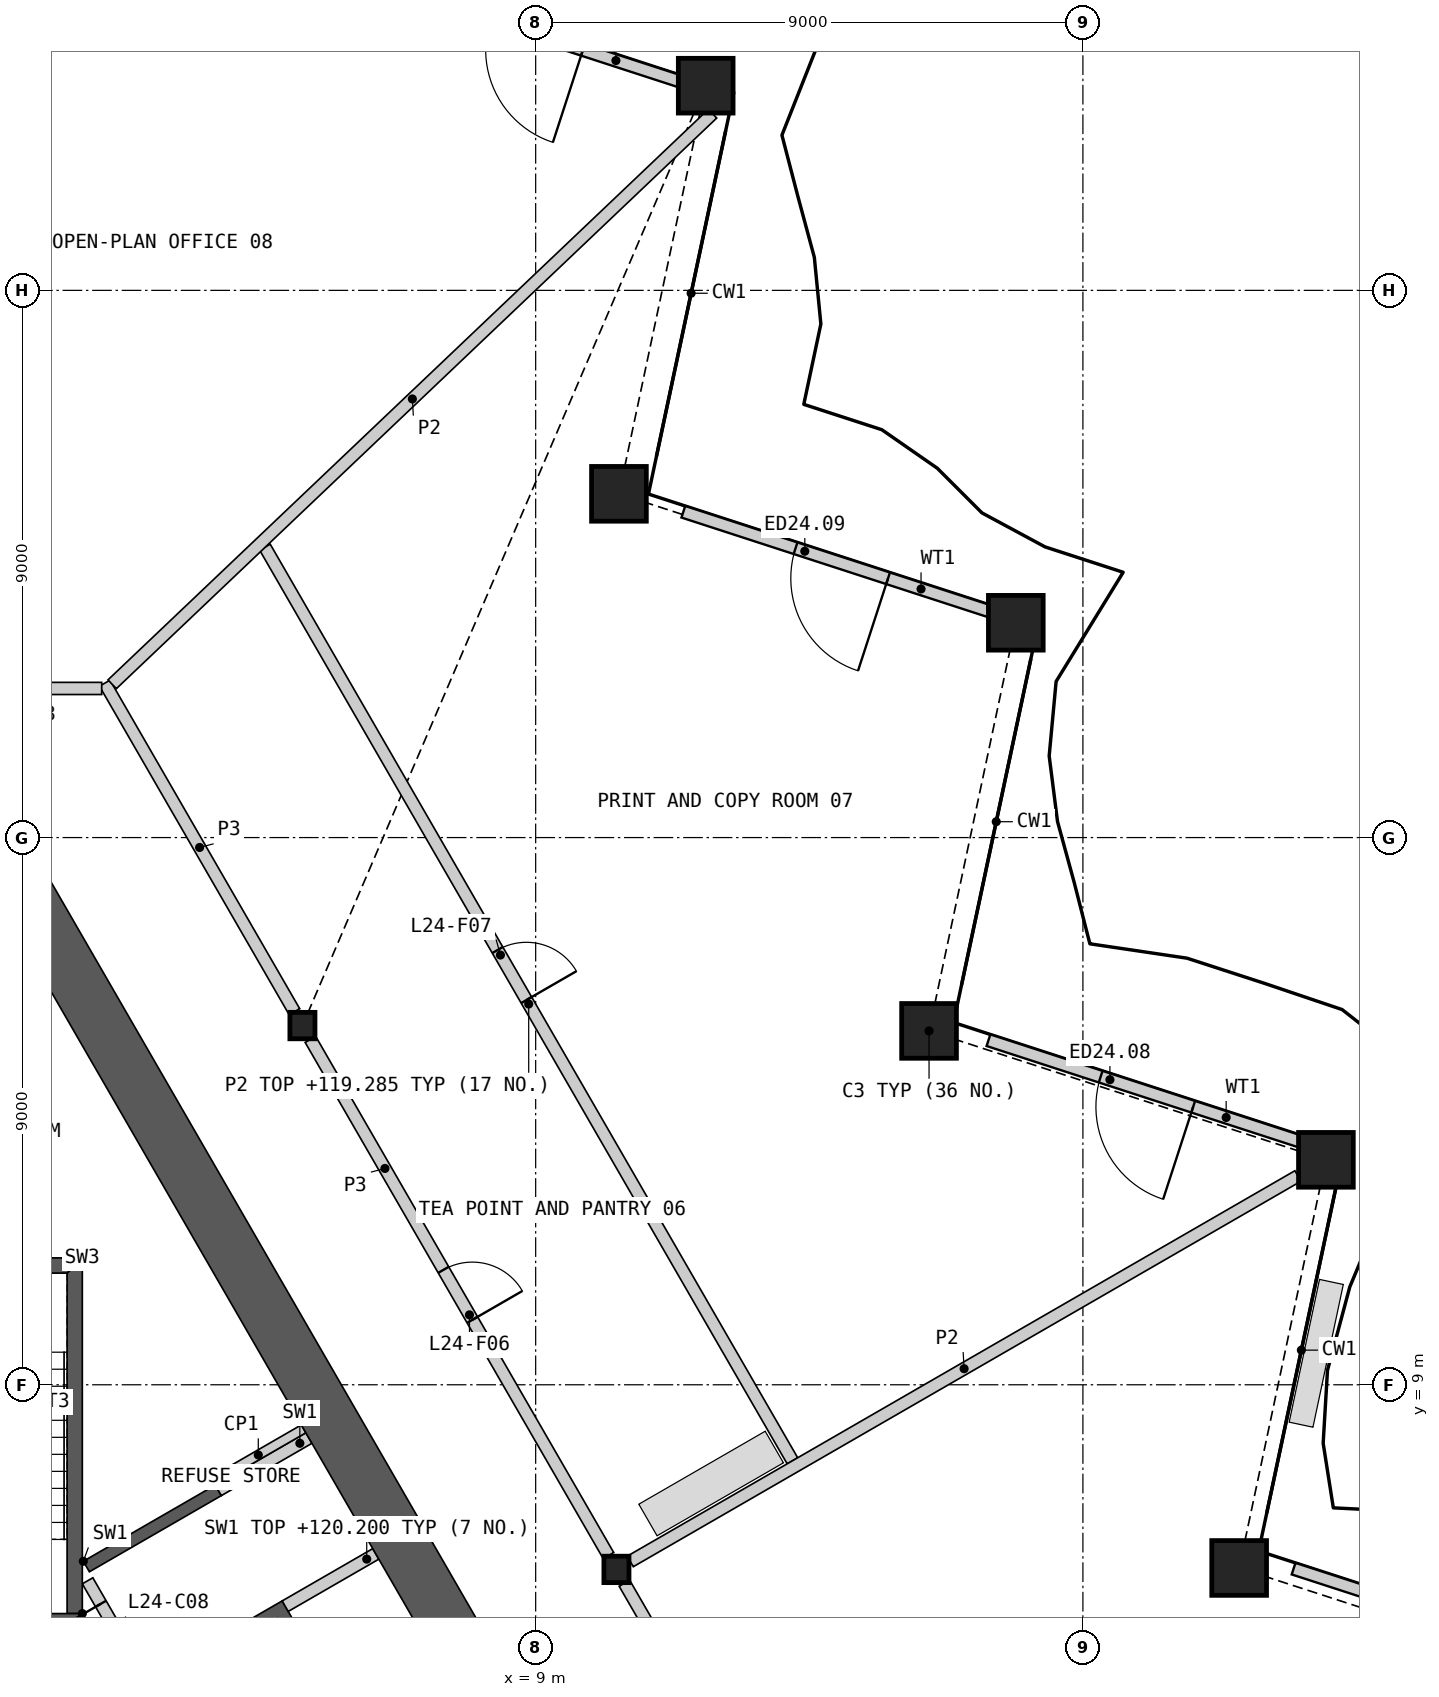
"""IFC4 building model, lengths in metres.
Left out: names, types, materials, properties, quantities, classifications, styles, units other than length and angle.
Written with IfcOpenShell. Run it as: python <this file> out.ifc"""

import sys

from ifc_helpers import new_model, si_unit, direction, frame, frame_2d, origin, origin_2d, place, context, subcontext, project, spatial, polyline, rectangle, hollow_rectangle, i_section, outline, extrude, element, fill, save


model = new_model("IFC4")
c1 = context("Model", 3, precision=1e-05, world=origin(), true_north=direction((0.0, 1.0)))
c2 = subcontext(c1, "Body", "Model", "MODEL_VIEW")
j1 = project(units=[si_unit("LENGTHUNIT", "METRE"), si_unit("PLANEANGLEUNIT", "RADIAN")], contexts=[c1])
p1 = place(None, origin())
s1 = spatial("IfcSite", under=j1, at=p1, CompositionType="ELEMENT")
p2 = place(p1, origin())
s2 = spatial("IfcBuilding", under=s1, at=p2, CompositionType="ELEMENT")
p3 = place(p2, frame((0.0, 0.0, 116.4)))
s3 = spatial("IfcBuildingStorey", under=s2, at=p3, CompositionType="ELEMENT", Elevation=116.4)
for number, where, z_axis, x_axis in (
    (1, (20.57, 5.987, 0.0), (0.0, 0.0, 1.0), (1.0, 0.0, 0.0)),
    (2, (21.996, 12.699, 0.0), (0.0, 0.0, 1.0), (1.0, 0.0, 0.0)),
    (3, (15.469, 14.82, 0.0), (0.0, 0.0, 1.0), (1.0, 0.0, 0.0)),
    (4, (16.896, 21.533, 0.0), (0.0, 0.0, 1.0), (1.0, 0.0, 0.0)),
    (5, (10.37, 23.654, 0.0), (0.0, 0.0, 1.0), (1.0, 0.0, 0.0)),
    (6, (11.796, 30.366, 0.0), (0.0, 0.0, 1.0), (1.0, 0.0, 0.0)),
):
    element("IfcColumn", number, at=place(p3, frame(where, z_axis=z_axis, x_axis=x_axis)), inside=s3, PredefinedType="COLUMN", context=c2, shape_type="SweptSolid", body=[
        extrude(hollow_rectangle(XDim=0.9, YDim=0.9, WallThickness=0.06, at=origin_2d()), origin(), (0.0, 0.0, 1.0), 4.2),
    ])
for number, where, z_axis, x_axis in (
    (7, (10.328, 5.963, 0.0), (0.0, 0.0, 1.0), (1.0, 0.0, 0.0)),
    (8, (5.164, 14.908, 0.0), (0.0, 0.0, 1.0), (1.0, 0.0, 0.0)),
):
    element("IfcColumn", number, at=place(p3, frame(where, z_axis=z_axis, x_axis=x_axis)), inside=s3, PredefinedType="COLUMN", context=c2, shape_type="SweptSolid", body=[
        extrude(i_section(OverallWidth=0.412, OverallDepth=0.435, WebThickness=0.036, FlangeThickness=0.057, at=origin_2d()), origin(), (0.0, 0.0, 1.0), 4.2),
    ])
p4 = place(p3, frame((26.677, 4.282, 0.0), z_axis=(0.0, 0.0, 1.0), x_axis=(-0.951052727247, 0.309028655624, 0.0)))
e9 = element("IfcWall", 9, at=p4, inside=s3, PredefinedType="SOLIDWALL", context=c2, shape_type="SweptSolid", body=[
    extrude(rectangle(XDim=5.48, YDim=0.2, at=frame_2d((2.74, 0.0))), origin(), (0.0, 0.0, 1.0), 3.189),
])
p5 = place(p4, frame((1.94, 0.0, 0.0)))
e10 = element("IfcOpeningElement", 10, at=p5, cuts=e9, PredefinedType="OPENING", context=c2, shape_type="SweptSolid", body=[
    extrude(rectangle(XDim=1.6, YDim=2.4, at=frame_2d((0.8, 1.2))), frame((0.0, 0.11, 0.0), z_axis=(0.0, -1.0, 0.0), x_axis=(1.0, 0.0, 0.0)), (0.0, 0.0, 1.0), 0.22),
])
p6 = place(p3, frame((21.659, 12.973, 0.0), z_axis=(0.0, 0.0, 1.0), x_axis=(-0.951065819309, 0.308988361175, 0.0)))
e11 = element("IfcWall", 11, at=p6, inside=s3, PredefinedType="SOLIDWALL", context=c2, shape_type="SweptSolid", body=[
    extrude(rectangle(XDim=5.48, YDim=0.2, at=frame_2d((2.74, 0.0))), origin(), (0.0, 0.0, 1.0), 3.189),
])
p7 = place(p6, frame((1.94, 0.0, 0.0)))
e12 = element("IfcOpeningElement", 12, at=p7, cuts=e11, PredefinedType="OPENING", context=c2, shape_type="SweptSolid", body=[
    extrude(rectangle(XDim=1.6, YDim=2.4, at=frame_2d((0.8, 1.2))), frame((0.0, 0.11, 0.0), z_axis=(0.0, -1.0, 0.0), x_axis=(1.0, 0.0, 0.0)), (0.0, 0.0, 1.0), 0.22),
])
p8 = place(p3, frame((16.641, 21.665, 0.0), z_axis=(0.0, 0.0, 1.0), x_axis=(-0.951052727247, 0.309028655624, 0.0)))
e13 = element("IfcWall", 13, at=p8, inside=s3, PredefinedType="SOLIDWALL", context=c2, shape_type="SweptSolid", body=[
    extrude(rectangle(XDim=5.48, YDim=0.2, at=frame_2d((2.74, 0.0))), origin(), (0.0, 0.0, 1.0), 3.189),
])
p9 = place(p8, frame((1.94, 0.0, 0.0)))
e14 = element("IfcOpeningElement", 14, at=p9, cuts=e13, PredefinedType="OPENING", context=c2, shape_type="SweptSolid", body=[
    extrude(rectangle(XDim=1.6, YDim=2.4, at=frame_2d((0.8, 1.2))), frame((0.0, 0.11, 0.0), z_axis=(0.0, -1.0, 0.0), x_axis=(1.0, 0.0, 0.0)), (0.0, 0.0, 1.0), 0.22),
])
p10 = place(p3, frame((11.623, 30.356, 0.0), z_axis=(0.0, 0.0, 1.0), x_axis=(-0.951052727247, 0.309028655624, 0.0)))
e15 = element("IfcWall", 15, at=p10, inside=s3, PredefinedType="SOLIDWALL", context=c2, shape_type="SweptSolid", body=[
    extrude(rectangle(XDim=5.48, YDim=0.2, at=frame_2d((2.74, 0.0))), origin(), (0.0, 0.0, 1.0), 3.189),
])
p11 = place(p10, frame((1.94, 0.0, 0.0)))
e16 = element("IfcOpeningElement", 16, at=p11, cuts=e15, PredefinedType="OPENING", context=c2, shape_type="SweptSolid", body=[
    extrude(rectangle(XDim=1.6, YDim=2.4, at=frame_2d((0.8, 1.2))), frame((0.0, 0.11, 0.0), z_axis=(0.0, -1.0, 0.0), x_axis=(1.0, 0.0, 0.0)), (0.0, 0.0, 1.0), 0.22),
])
p12 = place(p3, origin())
e17 = element("IfcWall", 17, at=p12, inside=s3, PredefinedType="SHEAR", context=c2, shape_type="SweptSolid", body=[
    extrude(outline(polyline([(1.561, 6.097), (3.731, 7.35), (3.831, 7.177), (1.66, 5.924), (1.561, 6.097)])), origin(), (0.0, 0.0, 1.0), 3.8),
])
p13 = place(p3, origin())
e18 = element("IfcWall", 18, at=p13, inside=s3, PredefinedType="SHEAR", context=c2, shape_type="SweptSolid", body=[
    extrude(outline(polyline([(2.66, 4.192), (4.831, 5.445), (8.231, -0.444), (6.061, -1.697), (5.96, -1.524), (7.952, -0.374), (6.952, 1.358), (4.96, 0.208), (4.861, 0.381), (6.852, 1.531), (5.852, 3.263), (3.861, 2.113), (3.76, 2.287), (5.752, 3.437), (4.752, 5.169), (2.76, 4.019), (2.66, 4.192)])), origin(), (0.0, 0.0, 1.0), 3.8),
])
p14 = place(p3, frame((5.817, -1.476, 0.0), z_axis=(0.0, 0.0, 1.0), x_axis=(-0.500002616675, 0.866023893041, 0.0)))
e19 = element("IfcWall", 19, at=p14, inside=s3, PredefinedType="SOLIDWALL", context=c2, shape_type="SweptSolid", body=[
    extrude(rectangle(XDim=8.373, YDim=0.2, at=frame_2d((4.187, 0.0))), origin(), (0.0, 0.0, 1.0), 3.8),
])
p15 = place(p14, frame((0.337, 0.0, 0.0)))
e20 = element("IfcOpeningElement", 20, at=p15, cuts=e19, PredefinedType="OPENING", context=c2, shape_type="SweptSolid", body=[
    extrude(rectangle(XDim=1.1, YDim=2.1, at=frame_2d((0.55, 1.05))), frame((0.0, 0.11, 0.0), z_axis=(0.0, -1.0, 0.0), x_axis=(1.0, 0.0, 0.0)), (0.0, 0.0, 1.0), 0.22),
])
p16 = place(p14, frame((2.537, 0.0, 0.0)))
e21 = element("IfcOpeningElement", 21, at=p16, cuts=e19, PredefinedType="OPENING", context=c2, shape_type="SweptSolid", body=[
    extrude(rectangle(XDim=1.1, YDim=2.1, at=frame_2d((0.55, 1.05))), frame((0.0, 0.11, 0.0), z_axis=(0.0, -1.0, 0.0), x_axis=(1.0, 0.0, 0.0)), (0.0, 0.0, 1.0), 0.22),
])
p17 = place(p14, frame((4.737, 0.0, 0.0)))
e22 = element("IfcOpeningElement", 22, at=p17, cuts=e19, PredefinedType="OPENING", context=c2, shape_type="SweptSolid", body=[
    extrude(rectangle(XDim=1.1, YDim=2.1, at=frame_2d((0.55, 1.05))), frame((0.0, 0.11, 0.0), z_axis=(0.0, -1.0, 0.0), x_axis=(1.0, 0.0, 0.0)), (0.0, 0.0, 1.0), 0.22),
])
p18 = place(p14, frame((7.037, 0.0, 0.0)))
e23 = element("IfcOpeningElement", 23, at=p18, cuts=e19, PredefinedType="OPENING", context=c2, shape_type="SweptSolid", body=[
    extrude(rectangle(XDim=0.9, YDim=2.1, at=frame_2d((0.45, 1.05))), frame((0.0, 0.11, 0.0), z_axis=(0.0, -1.0, 0.0), x_axis=(1.0, 0.0, 0.0)), (0.0, 0.0, 1.0), 0.22),
])
for number, where, z_axis, x_axis in (
    (24, (4.881, 5.358, 0.0), (0.0, 0.0, 1.0), (0.866, 0.5, 0.0)),
    (25, (3.781, 7.263, 0.0), (0.0, 0.0, 1.0), (0.866, 0.5, 0.0)),
):
    element("IfcWall", number, at=place(p3, frame(where, z_axis=z_axis, x_axis=x_axis)), inside=s3, PredefinedType="SHEAR", context=c2, shape_type="SweptSolid", body=[
        extrude(rectangle(XDim=1.72, YDim=0.2, at=frame_2d((0.86, 0.0))), origin(), (0.0, 0.0, 1.0), 3.8),
    ])
p19 = place(p3, origin())
e26 = element("IfcWall", 26, at=p19, inside=s3, PredefinedType="SHEAR", context=c2, shape_type="SweptSolid", body=[
    extrude(outline(polyline([(1.544, 5.237), (1.544, 11.087), (1.294, 10.837), (1.294, 5.237), (1.544, 5.237)])), origin(), (0.0, 0.0, 1.0), 3.8),
])
p20 = place(p3, origin())
e27 = element("IfcWall", 27, at=p20, inside=s3, PredefinedType="SHEAR", context=c2, shape_type="SweptSolid", body=[
    extrude(outline(polyline([(1.544, 11.087), (-1.544, 11.087), (-1.294, 10.837), (1.294, 10.837), (1.544, 11.087)])), origin(), (0.0, 0.0, 1.0), 3.8),
])
p21 = place(p3, frame((1.544, 5.112, 0.0), z_axis=(0.0, 0.0, 1.0), x_axis=(-1.0, 0.0, 0.0)))
e28 = element("IfcWall", 28, at=p21, inside=s3, PredefinedType="SHEAR", context=c2, shape_type="SweptSolid", body=[
    extrude(rectangle(XDim=3.088, YDim=0.25, at=frame_2d((1.544, 0.0))), origin(), (0.0, 0.0, 1.0), 3.8),
])
p22 = place(p21, frame((0.994, 0.0, 0.0)))
e29 = element("IfcOpeningElement", 29, at=p22, cuts=e28, PredefinedType="OPENING", context=c2, shape_type="SweptSolid", body=[
    extrude(rectangle(XDim=1.1, YDim=2.1, at=frame_2d((0.55, 1.05))), frame((0.0, 0.135, 0.0), z_axis=(0.0, -1.0, 0.0), x_axis=(1.0, 0.0, 0.0)), (0.0, 0.0, 1.0), 0.27),
])
p23 = place(p3, frame((3.693, 7.415, 0.0), z_axis=(0.0, 0.0, 1.0), x_axis=(0.866024871741, 0.500000921525, 0.0)))
e30 = element("IfcWall", 30, at=p23, inside=s3, PredefinedType="PARTITIONING", context=c2, shape_type="SweptSolid", body=[
    extrude(rectangle(XDim=1.72, YDim=0.15, at=frame_2d((0.86, 0.0))), origin(), (0.0, 0.0, 1.0), 3.8),
])
p24 = place(p3, frame((7.91, 4.451, 0.0), z_axis=(0.0, 0.0, 1.0), x_axis=(-0.500005799286, 0.866022055539, 0.0)))
e31 = element("IfcWall", 31, at=p24, inside=s3, PredefinedType="SHEAR", context=c2, shape_type="SweptSolid", body=[
    extrude(rectangle(XDim=15.041, YDim=0.9, at=frame_2d((7.521, 0.0))), origin(), (0.0, 0.0, 1.0), 3.8),
])
p25 = place(p3, frame((10.46, 5.736, 0.0), z_axis=(0.0, 0.0, 1.0), x_axis=(0.500004141693, -0.866023012564, 0.0)))
e32 = element("IfcWall", 32, at=p25, inside=s3, PredefinedType="PARTITIONING", context=c2, shape_type="SweptSolid", body=[
    extrude(rectangle(XDim=9.803, YDim=0.2, at=frame_2d((4.902, 0.0))), origin(), (0.0, 0.0, 1.0), 3.8),
])
p26 = place(p25, frame((4.352, 0.0, 0.0)))
e33 = element("IfcOpeningElement", 33, at=p26, cuts=e32, PredefinedType="OPENING", context=c2, shape_type="SweptSolid", body=[
    extrude(rectangle(XDim=1.0, YDim=2.1, at=frame_2d((0.5, 1.05))), frame((0.0, 0.11, 0.0), z_axis=(0.0, -1.0, 0.0), x_axis=(1.0, 0.0, 0.0)), (0.0, 0.0, 1.0), 0.22),
])
p27 = place(p3, frame((5.295, 14.68, 0.0), z_axis=(0.0, 0.0, 1.0), x_axis=(0.500012035596, -0.866018454918, 0.0)))
e34 = element("IfcWall", 34, at=p27, inside=s3, PredefinedType="PARTITIONING", context=c2, shape_type="SweptSolid", body=[
    extrude(rectangle(XDim=9.803, YDim=0.2, at=frame_2d((4.902, 0.0))), origin(), (0.0, 0.0, 1.0), 3.8),
])
p28 = place(p27, frame((4.376, 0.0, 0.0)))
e35 = element("IfcOpeningElement", 35, at=p28, cuts=e34, PredefinedType="OPENING", context=c2, shape_type="SweptSolid", body=[
    extrude(rectangle(XDim=0.95, YDim=2.1, at=frame_2d((0.475, 1.05))), frame((0.0, 0.11, 0.0), z_axis=(0.0, -1.0, 0.0), x_axis=(1.0, 0.0, 0.0)), (0.0, 0.0, 1.0), 0.22),
])
p29 = place(p3, frame((1.913, 20.539, 0.0), z_axis=(0.0, 0.0, 1.0), x_axis=(0.499980978912, -0.866036385336, 0.0)))
e36 = element("IfcWall", 36, at=p29, inside=s3, PredefinedType="PARTITIONING", context=c2, shape_type="SweptSolid", body=[
    extrude(rectangle(XDim=6.24, YDim=0.2, at=frame_2d((3.12, 0.0))), origin(), (0.0, 0.0, 1.0), 3.8),
])
p30 = place(p3, frame((-1.863, 20.453, 0.0), z_axis=(0.0, 0.0, 1.0), x_axis=(1.0, 0.0, 0.0)))
e37 = element("IfcWall", 37, at=p30, inside=s3, PredefinedType="PARTITIONING", context=c2, shape_type="SweptSolid", body=[
    extrude(rectangle(XDim=3.726, YDim=0.2, at=frame_2d((1.863, 0.0))), origin(), (0.0, 0.0, 1.0), 3.8),
])
p31 = place(p30, frame((0.963, 0.0, 0.0)))
e38 = element("IfcOpeningElement", 38, at=p31, cuts=e37, PredefinedType="OPENING", context=c2, shape_type="SweptSolid", body=[
    extrude(rectangle(XDim=1.8, YDim=2.1, at=frame_2d((0.9, 1.05))), frame((0.0, 0.11, 0.0), z_axis=(0.0, -1.0, 0.0), x_axis=(1.0, 0.0, 0.0)), (0.0, 0.0, 1.0), 0.22),
])
p32 = place(p3, frame((4.548, 22.775, 0.0), z_axis=(0.0, 0.0, 1.0), x_axis=(0.499999764473, -0.866025539766, 0.0)))
e39 = element("IfcWall", 39, at=p32, inside=s3, PredefinedType="PARTITIONING", context=c2, shape_type="SweptSolid", body=[
    extrude(rectangle(XDim=17.35, YDim=0.2, at=frame_2d((8.675, 0.0))), origin(), (0.0, 0.0, 1.0), 2.885),
])
p33 = place(p32, frame((7.65, 0.0, 0.0)))
e40 = element("IfcOpeningElement", 40, at=p33, cuts=e39, PredefinedType="OPENING", context=c2, shape_type="SweptSolid", body=[
    extrude(rectangle(XDim=0.95, YDim=2.1, at=frame_2d((0.475, 1.05))), frame((0.0, 0.11, 0.0), z_axis=(0.0, -1.0, 0.0), x_axis=(1.0, 0.0, 0.0)), (0.0, 0.0, 1.0), 0.22),
])
p34 = place(p3, frame((2.035, 20.521, 0.0), z_axis=(0.0, 0.0, 1.0), x_axis=(0.724819524984, 0.688938789881, 0.0)))
e41 = element("IfcWall", 41, at=p34, inside=s3, PredefinedType="PARTITIONING", context=c2, shape_type="SweptSolid", body=[
    extrude(rectangle(XDim=13.622, YDim=0.2, at=frame_2d((6.811, 0.0))), origin(), (0.0, 0.0, 1.0), 2.885),
])
p35 = place(p3, frame((10.556, 6.094, 0.0), z_axis=(0.0, 0.0, 1.0), x_axis=(0.86602461759, 0.500001361726, 0.0)))
e42 = element("IfcWall", 42, at=p35, inside=s3, PredefinedType="PARTITIONING", context=c2, shape_type="SweptSolid", body=[
    extrude(rectangle(XDim=12.679, YDim=0.2, at=frame_2d((6.34, 0.0))), origin(), (0.0, 0.0, 1.0), 2.885),
])
p36 = place(p7, origin())
e43 = element("IfcDoor", 43, at=p36, inside=s3, OperationType="DOUBLE_DOOR_SINGLE_SWING", PredefinedType="DOOR", context=c2, shape_type="SweptSolid", body=[
    extrude(rectangle(XDim=1.6, YDim=2.4, at=frame_2d((0.8, 1.2))), frame((0.0, 0.025, 0.0), z_axis=(0.0, -1.0, 0.0), x_axis=(1.0, 0.0, 0.0)), (0.0, 0.0, 1.0), 0.05),
])
fill(e12, e43)
p37 = place(p9, origin())
e44 = element("IfcDoor", 44, at=p37, inside=s3, OperationType="DOUBLE_DOOR_SINGLE_SWING", PredefinedType="DOOR", context=c2, shape_type="SweptSolid", body=[
    extrude(rectangle(XDim=1.6, YDim=2.4, at=frame_2d((0.8, 1.2))), frame((0.0, 0.025, 0.0), z_axis=(0.0, -1.0, 0.0), x_axis=(1.0, 0.0, 0.0)), (0.0, 0.0, 1.0), 0.05),
])
fill(e14, e44)
p38 = place(p18, origin())
e45 = element("IfcDoor", 45, at=p38, inside=s3, OperationType="SINGLE_SWING_RIGHT", PredefinedType="DOOR", context=c2, shape_type="SweptSolid", body=[
    extrude(rectangle(XDim=0.9, YDim=2.1, at=frame_2d((0.45, 1.05))), frame((0.0, 0.025, 0.0), z_axis=(0.0, -1.0, 0.0), x_axis=(1.0, 0.0, 0.0)), (0.0, 0.0, 1.0), 0.05),
])
fill(e23, e45)
p39 = place(p28, origin())
e46 = element("IfcDoor", 46, at=p39, inside=s3, OperationType="SINGLE_SWING_RIGHT", PredefinedType="DOOR", context=c2, shape_type="SweptSolid", body=[
    extrude(rectangle(XDim=0.95, YDim=2.1, at=frame_2d((0.475, 1.05))), frame((0.0, 0.025, 0.0), z_axis=(0.0, -1.0, 0.0), x_axis=(1.0, 0.0, 0.0)), (0.0, 0.0, 1.0), 0.05),
])
fill(e35, e46)
p40 = place(p33, origin())
e47 = element("IfcDoor", 47, at=p40, inside=s3, OperationType="SINGLE_SWING_RIGHT", PredefinedType="DOOR", context=c2, shape_type="SweptSolid", body=[
    extrude(rectangle(XDim=0.95, YDim=2.1, at=frame_2d((0.475, 1.05))), frame((0.0, 0.025, 0.0), z_axis=(0.0, -1.0, 0.0), x_axis=(1.0, 0.0, 0.0)), (0.0, 0.0, 1.0), 0.05),
])
fill(e40, e47)
save(model, sys.argv[1])
